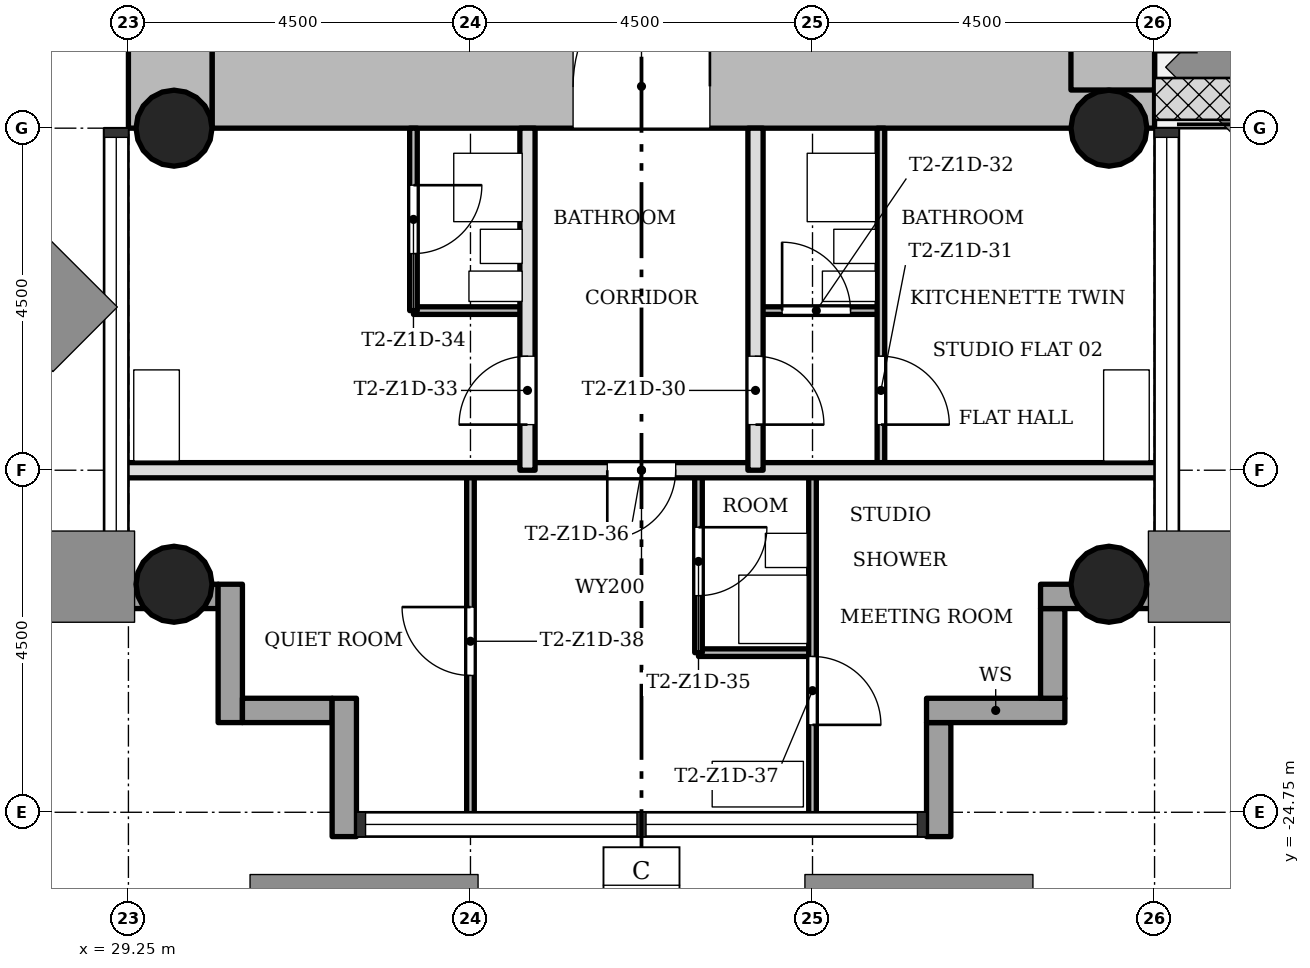
"""IFC4 building model, lengths in metres.
Left out: names, types, materials, properties, quantities, classifications, styles, units other than length and angle.
Written with IfcOpenShell. Run it as: python <this file> out.ifc"""

import sys

from ifc_helpers import new_model, si_unit, direction, frame, frame_2d, origin, origin_2d, place, context, subcontext, project, spatial, rectangle, hollow_circle, extrude, element, fill, save


model = new_model("IFC4")
c1 = context("Model", 3, precision=1e-05, world=origin(), true_north=direction((0.0, 1.0)))
c2 = subcontext(c1, "Body", "Model", "MODEL_VIEW")
j1 = project(units=[si_unit("LENGTHUNIT", "METRE"), si_unit("PLANEANGLEUNIT", "RADIAN")], contexts=[c1])
p1 = place(None, origin())
s1 = spatial("IfcSite", under=j1, at=p1, CompositionType="ELEMENT")
p2 = place(p1, origin())
s2 = spatial("IfcBuilding", under=s1, at=p2, CompositionType="ELEMENT")
p3 = place(p2, frame((0.0, 0.0, 58.5)))
s3 = spatial("IfcBuildingStorey", under=s2, at=p3, CompositionType="ELEMENT", Elevation=58.5)
p4 = place(p3, frame((30.35, -15.2, 0.0), z_axis=(0.0, 0.0, 1.0), x_axis=(1.0, 0.0, 0.0)))
e1 = element("IfcWall", 1, at=p4, inside=s3, PredefinedType="SHEAR", context=c2, shape_type="SweptSolid", body=[
    extrude(rectangle(XDim=12.4, YDim=1.1, at=frame_2d((6.2, 0.0))), origin(), (0.0, 0.0, 1.0), 3.4),
])
p5 = place(p4, frame((4.75, 0.0, 0.0)))
e2 = element("IfcOpeningElement", 2, at=p5, cuts=e1, PredefinedType="OPENING", context=c2, shape_type="SweptSolid", body=[
    extrude(rectangle(XDim=1.8, YDim=2.1, at=frame_2d((0.9, 1.05))), frame((0.0, 0.56, 0.0), z_axis=(0.0, -1.0, 0.0), x_axis=(1.0, 0.0, 0.0)), (0.0, 0.0, 1.0), 1.12),
])
p6 = place(p3, frame((42.2, -15.248, 0.0), z_axis=(0.0, 0.0, 1.0), x_axis=(0.0, 1.0, 0.0)))
e3 = element("IfcWall", 3, at=p6, inside=s3, PredefinedType="SHEAR", context=c2, shape_type="SweptSolid", body=[
    extrude(rectangle(XDim=8.596, YDim=1.1, at=frame_2d((4.298, 0.0))), origin(), (0.0, 0.0, 1.0), 3.4),
])
p7 = place(p3, frame((29.8, -7.85, 0.0), z_axis=(0.0, 0.0, 1.0), x_axis=(0.0, -1.0, 0.0)))
e4 = element("IfcWall", 4, at=p7, inside=s3, PredefinedType="SHEAR", context=c2, shape_type="SweptSolid", body=[
    extrude(rectangle(XDim=7.9, YDim=1.1, at=frame_2d((3.95, 0.0))), origin(), (0.0, 0.0, 1.0), 3.4),
])
for number, where, z_axis, x_axis in (
    (5, (42.15, -15.75, 0.0), (0.0, 0.0, 1.0), (1.0, 0.0, 0.0)),
    (6, (29.85, -15.75, 0.0), (0.0, 0.0, 1.0), (1.0, 0.0, 0.0)),
    (7, (42.15, -21.75, 0.0), (0.0, 0.0, 1.0), (1.0, 0.0, 0.0)),
    (8, (29.85, -21.75, 0.0), (0.0, 0.0, 1.0), (1.0, 0.0, 0.0)),
):
    element("IfcColumn", number, at=place(p3, frame(where, z_axis=z_axis, x_axis=x_axis)), inside=s3, PredefinedType="COLUMN", context=c2, shape_type="SweptSolid", body=[
        extrude(hollow_circle(Radius=0.5, WallThickness=0.036, at=origin_2d()), origin(), (0.0, 0.0, 1.0), 3.4),
    ])
p8 = place(p3, frame((39.91, -25.07, -0.3), z_axis=(0.0, 0.0, 1.0), x_axis=(0.0, 1.0, 0.0)))
e9 = element("IfcWall", 9, at=p8, inside=s3, PredefinedType="STANDARD", context=c2, shape_type="SweptSolid", body=[
    extrude(rectangle(XDim=1.5, YDim=0.32, at=frame_2d((0.75, 0.0))), origin(), (0.0, 0.0, 1.0), 3.4),
])
p9 = place(p3, frame((39.75, -23.41, -0.3), z_axis=(0.0, 0.0, 1.0), x_axis=(1.0, 0.0, 0.0)))
e10 = element("IfcWall", 10, at=p9, inside=s3, PredefinedType="STANDARD", context=c2, shape_type="SweptSolid", body=[
    extrude(rectangle(XDim=1.82, YDim=0.32, at=frame_2d((0.91, 0.0))), origin(), (0.0, 0.0, 1.0), 3.4),
])
p10 = place(p3, frame((41.41, -23.25, -0.3), z_axis=(0.0, 0.0, 1.0), x_axis=(0.0, 1.0, 0.0)))
e11 = element("IfcWall", 11, at=p10, inside=s3, PredefinedType="STANDARD", context=c2, shape_type="SweptSolid", body=[
    extrude(rectangle(XDim=1.18, YDim=0.32, at=frame_2d((0.59, 0.0))), origin(), (0.0, 0.0, 1.0), 3.4),
])
p11 = place(p3, frame((41.25, -21.91, -0.3), z_axis=(0.0, 0.0, 1.0), x_axis=(1.0, 0.0, 0.0)))
e12 = element("IfcWall", 12, at=p11, inside=s3, PredefinedType="STANDARD", context=c2, shape_type="SweptSolid", body=[
    extrude(rectangle(XDim=1.82, YDim=0.32, at=frame_2d((0.91, 0.0))), origin(), (0.0, 0.0, 1.0), 3.4),
])
p12 = place(p3, frame((28.93, -21.91, -0.3), z_axis=(0.0, 0.0, 1.0), x_axis=(1.0, 0.0, 0.0)))
e13 = element("IfcWall", 13, at=p12, inside=s3, PredefinedType="STANDARD", context=c2, shape_type="SweptSolid", body=[
    extrude(rectangle(XDim=1.5, YDim=0.32, at=frame_2d((0.75, 0.0))), origin(), (0.0, 0.0, 1.0), 3.4),
])
p13 = place(p3, frame((30.59, -21.75, -0.3), z_axis=(0.0, 0.0, 1.0), x_axis=(0.0, -1.0, 0.0)))
e14 = element("IfcWall", 14, at=p13, inside=s3, PredefinedType="STANDARD", context=c2, shape_type="SweptSolid", body=[
    extrude(rectangle(XDim=1.82, YDim=0.32, at=frame_2d((0.91, 0.0))), origin(), (0.0, 0.0, 1.0), 3.4),
])
p14 = place(p3, frame((30.75, -23.41, -0.3), z_axis=(0.0, 0.0, 1.0), x_axis=(1.0, 0.0, 0.0)))
e15 = element("IfcWall", 15, at=p14, inside=s3, PredefinedType="STANDARD", context=c2, shape_type="SweptSolid", body=[
    extrude(rectangle(XDim=1.18, YDim=0.32, at=frame_2d((0.59, 0.0))), origin(), (0.0, 0.0, 1.0), 3.4),
])
p15 = place(p3, frame((32.09, -23.25, -0.3), z_axis=(0.0, 0.0, 1.0), x_axis=(0.0, -1.0, 0.0)))
e16 = element("IfcWall", 16, at=p15, inside=s3, PredefinedType="STANDARD", context=c2, shape_type="SweptSolid", body=[
    extrude(rectangle(XDim=1.82, YDim=0.32, at=frame_2d((0.91, 0.0))), origin(), (0.0, 0.0, 1.0), 3.4),
])
p16 = place(p3, frame((38.25, -22.65, 0.0), z_axis=(0.0, 0.0, 1.0), x_axis=(-1.0, 0.0, 0.0)))
e17 = element("IfcWall", 17, at=p16, inside=s3, PredefinedType="PARTITIONING", context=c2, shape_type="SweptSolid", body=[
    extrude(rectangle(XDim=1.5, YDim=0.1, at=frame_2d((0.75, 0.0))), origin(), (0.0, 0.0, 1.0), 3.0),
])
p17 = place(p3, frame((42.85, -20.25, 0.0), z_axis=(0.0, 0.0, 1.0), x_axis=(-1.0, 0.0, 0.0)))
e18 = element("IfcWall", 18, at=p17, inside=s3, PredefinedType="SOLIDWALL", context=c2, shape_type="SweptSolid", body=[
    extrude(rectangle(XDim=13.7, YDim=0.2, at=frame_2d((6.85, 0.0))), origin(), (0.0, 0.0, 1.0), 3.0),
])
p18 = place(p17, frame((6.4, 0.0, 0.0)))
e19 = element("IfcOpeningElement", 19, at=p18, cuts=e18, PredefinedType="OPENING", context=c2, shape_type="SweptSolid", body=[
    extrude(rectangle(XDim=0.9, YDim=2.1, at=frame_2d((0.45, 1.05))), frame((0.0, 0.11, 0.0), z_axis=(0.0, -1.0, 0.0), x_axis=(1.0, 0.0, 0.0)), (0.0, 0.0, 1.0), 0.22),
])
p19 = place(p3, frame((39.15, -18.15, 0.0), z_axis=(0.0, 0.0, 1.0), x_axis=(-1.0, 0.0, 0.0)))
e20 = element("IfcWall", 20, at=p19, inside=s3, PredefinedType="PARTITIONING", context=c2, shape_type="SweptSolid", body=[
    extrude(rectangle(XDim=1.65, YDim=0.1, at=frame_2d((0.825, 0.0))), origin(), (0.0, 0.0, 1.0), 3.0),
])
p20 = place(p19, frame((0.4, 0.0, 0.0)))
e21 = element("IfcOpeningElement", 21, at=p20, cuts=e20, PredefinedType="OPENING", context=c2, shape_type="SweptSolid", body=[
    extrude(rectangle(XDim=0.9, YDim=2.1, at=frame_2d((0.45, 1.05))), frame((0.0, 0.06, 0.0), z_axis=(0.0, -1.0, 0.0), x_axis=(1.0, 0.0, 0.0)), (0.0, 0.0, 1.0), 0.12),
])
p21 = place(p3, frame((34.5, -18.15, 0.0), z_axis=(0.0, 0.0, 1.0), x_axis=(-1.0, 0.0, 0.0)))
e22 = element("IfcWall", 22, at=p21, inside=s3, PredefinedType="PARTITIONING", context=c2, shape_type="SweptSolid", body=[
    extrude(rectangle(XDim=1.5, YDim=0.1, at=frame_2d((0.75, 0.0))), origin(), (0.0, 0.0, 1.0), 3.0),
])
p22 = place(p3, frame((39.15, -20.25, 0.0), z_axis=(0.0, 0.0, 1.0), x_axis=(0.0, 1.0, 0.0)))
e23 = element("IfcWall", 23, at=p22, inside=s3, PredefinedType="PARTITIONING", context=c2, shape_type="SweptSolid", body=[
    extrude(rectangle(XDim=4.5, YDim=0.1, at=frame_2d((2.25, 0.0))), origin(), (0.0, 0.0, 1.0), 3.0),
])
p23 = place(p22, frame((0.6, 0.0, 0.0)))
e24 = element("IfcOpeningElement", 24, at=p23, cuts=e23, PredefinedType="OPENING", context=c2, shape_type="SweptSolid", body=[
    extrude(rectangle(XDim=0.9, YDim=2.1, at=frame_2d((0.45, 1.05))), frame((0.0, 0.06, 0.0), z_axis=(0.0, -1.0, 0.0), x_axis=(1.0, 0.0, 0.0)), (0.0, 0.0, 1.0), 0.12),
])
p24 = place(p3, frame((38.25, -24.85, 0.0), z_axis=(0.0, 0.0, 1.0), x_axis=(0.0, 1.0, 0.0)))
e25 = element("IfcWall", 25, at=p24, inside=s3, PredefinedType="PARTITIONING", context=c2, shape_type="SweptSolid", body=[
    extrude(rectangle(XDim=4.6, YDim=0.1, at=frame_2d((2.3, 0.0))), origin(), (0.0, 0.0, 1.0), 3.0),
])
p25 = place(p24, frame((1.25, 0.0, 0.0)))
e26 = element("IfcOpeningElement", 26, at=p25, cuts=e25, PredefinedType="OPENING", context=c2, shape_type="SweptSolid", body=[
    extrude(rectangle(XDim=0.9, YDim=2.1, at=frame_2d((0.45, 1.05))), frame((0.0, 0.06, 0.0), z_axis=(0.0, -1.0, 0.0), x_axis=(1.0, 0.0, 0.0)), (0.0, 0.0, 1.0), 0.12),
])
p26 = place(p3, frame((37.5, -20.25, 0.0), z_axis=(0.0, 0.0, 1.0), x_axis=(0.0, 1.0, 0.0)))
e27 = element("IfcWall", 27, at=p26, inside=s3, PredefinedType="SOLIDWALL", context=c2, shape_type="SweptSolid", body=[
    extrude(rectangle(XDim=4.5, YDim=0.2, at=frame_2d((2.25, 0.0))), origin(), (0.0, 0.0, 1.0), 3.0),
])
p27 = place(p26, frame((0.6, 0.0, 0.0)))
e28 = element("IfcOpeningElement", 28, at=p27, cuts=e27, PredefinedType="OPENING", context=c2, shape_type="SweptSolid", body=[
    extrude(rectangle(XDim=0.9, YDim=2.1, at=frame_2d((0.45, 1.05))), frame((0.0, 0.11, 0.0), z_axis=(0.0, -1.0, 0.0), x_axis=(1.0, 0.0, 0.0)), (0.0, 0.0, 1.0), 0.22),
])
p28 = place(p3, frame((36.75, -22.65, 0.0), z_axis=(0.0, 0.0, 1.0), x_axis=(0.0, 1.0, 0.0)))
e29 = element("IfcWall", 29, at=p28, inside=s3, PredefinedType="PARTITIONING", context=c2, shape_type="SweptSolid", body=[
    extrude(rectangle(XDim=2.4, YDim=0.1, at=frame_2d((1.2, 0.0))), origin(), (0.0, 0.0, 1.0), 3.0),
])
p29 = place(p28, frame((0.75, 0.0, 0.0)))
e30 = element("IfcOpeningElement", 30, at=p29, cuts=e29, PredefinedType="OPENING", context=c2, shape_type="SweptSolid", body=[
    extrude(rectangle(XDim=0.9, YDim=2.1, at=frame_2d((0.45, 1.05))), frame((0.0, 0.06, 0.0), z_axis=(0.0, -1.0, 0.0), x_axis=(1.0, 0.0, 0.0)), (0.0, 0.0, 1.0), 0.12),
])
p30 = place(p3, frame((34.5, -20.25, 0.0), z_axis=(0.0, 0.0, 1.0), x_axis=(0.0, 1.0, 0.0)))
e31 = element("IfcWall", 31, at=p30, inside=s3, PredefinedType="SOLIDWALL", context=c2, shape_type="SweptSolid", body=[
    extrude(rectangle(XDim=4.5, YDim=0.2, at=frame_2d((2.25, 0.0))), origin(), (0.0, 0.0, 1.0), 3.0),
])
p31 = place(p30, frame((0.6, 0.0, 0.0)))
e32 = element("IfcOpeningElement", 32, at=p31, cuts=e31, PredefinedType="OPENING", context=c2, shape_type="SweptSolid", body=[
    extrude(rectangle(XDim=0.9, YDim=2.1, at=frame_2d((0.45, 1.05))), frame((0.0, 0.11, 0.0), z_axis=(0.0, -1.0, 0.0), x_axis=(1.0, 0.0, 0.0)), (0.0, 0.0, 1.0), 0.22),
])
p32 = place(p3, frame((33.75, -24.85, 0.0), z_axis=(0.0, 0.0, 1.0), x_axis=(0.0, 1.0, 0.0)))
e33 = element("IfcWall", 33, at=p32, inside=s3, PredefinedType="PARTITIONING", context=c2, shape_type="SweptSolid", body=[
    extrude(rectangle(XDim=4.6, YDim=0.1, at=frame_2d((2.3, 0.0))), origin(), (0.0, 0.0, 1.0), 3.0),
])
p33 = place(p32, frame((1.9, 0.0, 0.0)))
e34 = element("IfcOpeningElement", 34, at=p33, cuts=e33, PredefinedType="OPENING", context=c2, shape_type="SweptSolid", body=[
    extrude(rectangle(XDim=0.9, YDim=2.1, at=frame_2d((0.45, 1.05))), frame((0.0, 0.06, 0.0), z_axis=(0.0, -1.0, 0.0), x_axis=(1.0, 0.0, 0.0)), (0.0, 0.0, 1.0), 0.12),
])
p34 = place(p3, frame((33.0, -18.15, 0.0), z_axis=(0.0, 0.0, 1.0), x_axis=(0.0, 1.0, 0.0)))
e35 = element("IfcWall", 35, at=p34, inside=s3, PredefinedType="PARTITIONING", context=c2, shape_type="SweptSolid", body=[
    extrude(rectangle(XDim=2.4, YDim=0.1, at=frame_2d((1.2, 0.0))), origin(), (0.0, 0.0, 1.0), 3.0),
])
p35 = place(p34, frame((0.75, 0.0, 0.0)))
e36 = element("IfcOpeningElement", 36, at=p35, cuts=e35, PredefinedType="OPENING", context=c2, shape_type="SweptSolid", body=[
    extrude(rectangle(XDim=0.9, YDim=2.1, at=frame_2d((0.45, 1.05))), frame((0.0, 0.06, 0.0), z_axis=(0.0, -1.0, 0.0), x_axis=(1.0, 0.0, 0.0)), (0.0, 0.0, 1.0), 0.12),
])
p36 = place(p27, origin())
e37 = element("IfcDoor", 37, at=p36, inside=s3, OperationType="SINGLE_SWING_LEFT", PredefinedType="DOOR", context=c2, shape_type="SweptSolid", body=[
    extrude(rectangle(XDim=0.9, YDim=2.1, at=frame_2d((0.45, 1.05))), frame((0.0, 0.025, 0.0), z_axis=(0.0, -1.0, 0.0), x_axis=(1.0, 0.0, 0.0)), (0.0, 0.0, 1.0), 0.05),
])
fill(e28, e37)
p37 = place(p23, origin())
e38 = element("IfcDoor", 38, at=p37, inside=s3, OperationType="SINGLE_SWING_LEFT", PredefinedType="DOOR", context=c2, shape_type="SweptSolid", body=[
    extrude(rectangle(XDim=0.9, YDim=2.1, at=frame_2d((0.45, 1.05))), frame((0.0, 0.025, 0.0), z_axis=(0.0, -1.0, 0.0), x_axis=(1.0, 0.0, 0.0)), (0.0, 0.0, 1.0), 0.05),
])
fill(e24, e38)
p38 = place(p20, origin())
e39 = element("IfcDoor", 39, at=p38, inside=s3, OperationType="SINGLE_SWING_RIGHT", PredefinedType="DOOR", context=c2, shape_type="SweptSolid", body=[
    extrude(rectangle(XDim=0.9, YDim=2.1, at=frame_2d((0.45, 1.05))), frame((0.0, 0.025, 0.0), z_axis=(0.0, -1.0, 0.0), x_axis=(1.0, 0.0, 0.0)), (0.0, 0.0, 1.0), 0.05),
])
fill(e21, e39)
p39 = place(p31, origin())
e40 = element("IfcDoor", 40, at=p39, inside=s3, OperationType="SINGLE_SWING_RIGHT", PredefinedType="DOOR", context=c2, shape_type="SweptSolid", body=[
    extrude(rectangle(XDim=0.9, YDim=2.1, at=frame_2d((0.45, 1.05))), frame((0.0, 0.025, 0.0), z_axis=(0.0, -1.0, 0.0), x_axis=(1.0, 0.0, 0.0)), (0.0, 0.0, 1.0), 0.05),
])
fill(e32, e40)
p40 = place(p35, origin())
e41 = element("IfcDoor", 41, at=p40, inside=s3, OperationType="SINGLE_SWING_RIGHT", PredefinedType="DOOR", context=c2, shape_type="SweptSolid", body=[
    extrude(rectangle(XDim=0.9, YDim=2.1, at=frame_2d((0.45, 1.05))), frame((0.0, 0.025, 0.0), z_axis=(0.0, -1.0, 0.0), x_axis=(1.0, 0.0, 0.0)), (0.0, 0.0, 1.0), 0.05),
])
fill(e36, e41)
p41 = place(p29, origin())
e42 = element("IfcDoor", 42, at=p41, inside=s3, OperationType="SINGLE_SWING_RIGHT", PredefinedType="DOOR", context=c2, shape_type="SweptSolid", body=[
    extrude(rectangle(XDim=0.9, YDim=2.1, at=frame_2d((0.45, 1.05))), frame((0.0, 0.025, 0.0), z_axis=(0.0, -1.0, 0.0), x_axis=(1.0, 0.0, 0.0)), (0.0, 0.0, 1.0), 0.05),
])
fill(e30, e42)
p42 = place(p18, origin())
e43 = element("IfcDoor", 43, at=p42, inside=s3, OperationType="SINGLE_SWING_LEFT", PredefinedType="DOOR", context=c2, shape_type="SweptSolid", body=[
    extrude(rectangle(XDim=0.9, YDim=2.1, at=frame_2d((0.45, 1.05))), frame((0.0, 0.025, 0.0), z_axis=(0.0, -1.0, 0.0), x_axis=(1.0, 0.0, 0.0)), (0.0, 0.0, 1.0), 0.05),
])
fill(e19, e43)
p43 = place(p25, origin())
e44 = element("IfcDoor", 44, at=p43, inside=s3, OperationType="SINGLE_SWING_LEFT", PredefinedType="DOOR", context=c2, shape_type="SweptSolid", body=[
    extrude(rectangle(XDim=0.9, YDim=2.1, at=frame_2d((0.45, 1.05))), frame((0.0, 0.025, 0.0), z_axis=(0.0, -1.0, 0.0), x_axis=(1.0, 0.0, 0.0)), (0.0, 0.0, 1.0), 0.05),
])
fill(e26, e44)
p44 = place(p33, origin())
e45 = element("IfcDoor", 45, at=p44, inside=s3, OperationType="SINGLE_SWING_LEFT", PredefinedType="DOOR", context=c2, shape_type="SweptSolid", body=[
    extrude(rectangle(XDim=0.9, YDim=2.1, at=frame_2d((0.45, 1.05))), frame((0.0, 0.025, 0.0), z_axis=(0.0, -1.0, 0.0), x_axis=(1.0, 0.0, 0.0)), (0.0, 0.0, 1.0), 0.05),
])
fill(e34, e45)
p45 = place(p5, origin())
e46 = element("IfcDoor", 46, at=p45, inside=s3, OperationType="SINGLE_SWING_LEFT", PredefinedType="DOOR", context=c2, shape_type="SweptSolid", body=[
    extrude(rectangle(XDim=1.8, YDim=2.1, at=frame_2d((0.9, 1.05))), frame((0.0, 0.025, 0.0), z_axis=(0.0, -1.0, 0.0), x_axis=(1.0, 0.0, 0.0)), (0.0, 0.0, 1.0), 0.05),
])
fill(e2, e46)
save(model, sys.argv[1])
